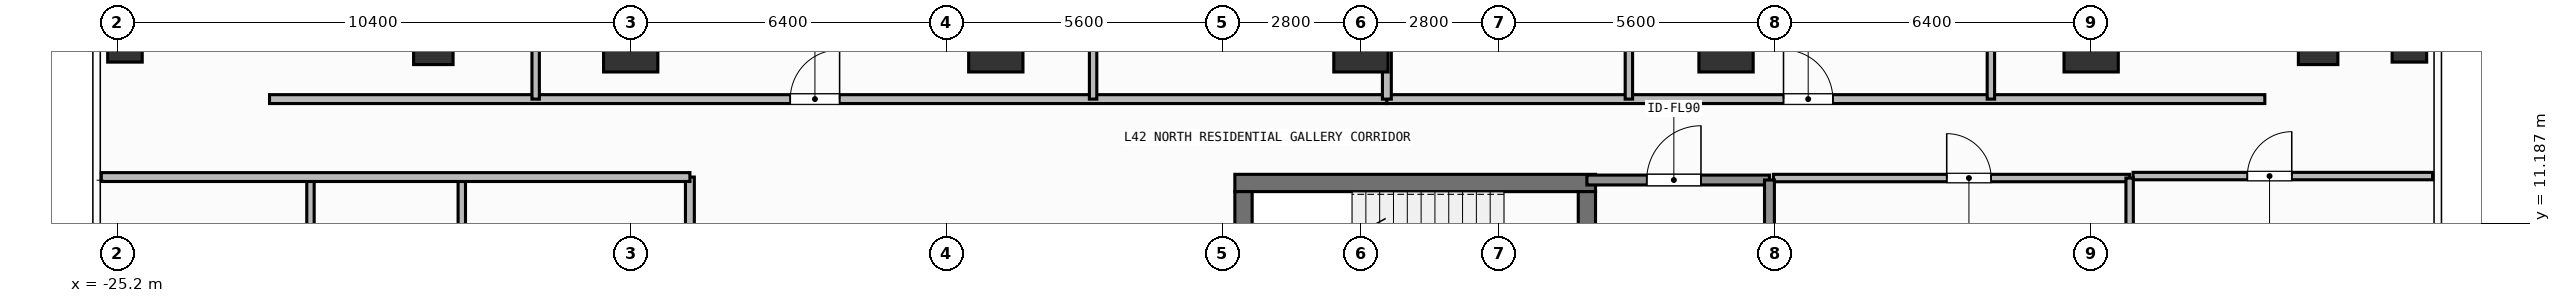
"""IFC4 building model, lengths in metres.
Left out: names, types, materials, properties, quantities, classifications, styles, units other than length and angle.
Written with IfcOpenShell. Run it as: python <this file> out.ifc"""

import sys

from ifc_helpers import new_model, si_unit, direction, frame, frame_2d, origin, origin_2d, place, context, subcontext, project, spatial, rectangle, hollow_rectangle, extrude, element, fill, save


model = new_model("IFC4")
c1 = context("Model", 3, precision=1e-05, world=origin(), true_north=direction((0.0, 1.0)))
c2 = subcontext(c1, "Body", "Model", "MODEL_VIEW")
j1 = project(units=[si_unit("LENGTHUNIT", "METRE"), si_unit("PLANEANGLEUNIT", "RADIAN")], contexts=[c1])
p1 = place(None, origin())
s1 = spatial("IfcSite", under=j1, at=p1, CompositionType="ELEMENT")
p2 = place(p1, origin())
s2 = spatial("IfcBuilding", under=s1, at=p2, CompositionType="ELEMENT")
p3 = place(p2, frame((0.0, 0.0, 171.9)))
s3 = spatial("IfcBuildingStorey", under=s2, at=p3, CompositionType="ELEMENT", Elevation=171.9)
p4 = place(p3, frame((-2.555, 12.0, 0.0), z_axis=(0.0, 0.0, 1.0), x_axis=(1.0, 0.0, 0.0)))
e1 = element("IfcWall", 1, at=p4, inside=s3, PredefinedType="SHEAR", context=c2, shape_type="SweptSolid", body=[
    extrude(rectangle(XDim=7.31, YDim=0.35, at=frame_2d((3.655, 0.0))), origin(), (0.0, 0.0, 1.0), 3.9),
])
p5 = place(p3, frame((-2.38, 8.9, 0.0), z_axis=(0.0, 0.0, 1.0), x_axis=(0.0, 1.0, 0.0)))
e2 = element("IfcWall", 2, at=p5, inside=s3, PredefinedType="SHEAR", context=c2, shape_type="SweptSolid", body=[
    extrude(rectangle(XDim=2.925, YDim=0.35, at=frame_2d((1.462, 0.0))), origin(), (0.0, 0.0, 1.0), 3.9),
])
p6 = place(p3, frame((4.58, 11.825, 0.0), z_axis=(0.0, 0.0, 1.0), x_axis=(0.0, -1.0, 0.0)))
e3 = element("IfcWall", 3, at=p6, inside=s3, PredefinedType="SHEAR", context=c2, shape_type="SweptSolid", body=[
    extrude(rectangle(XDim=2.925, YDim=0.35, at=frame_2d((1.462, 0.0))), origin(), (0.0, 0.0, 1.0), 3.9),
])
p7 = place(p6, frame((0.913, 0.0, 0.0)))
e4 = element("IfcOpeningElement", 4, at=p7, cuts=e3, PredefinedType="OPENING", context=c2, shape_type="SweptSolid", body=[
    extrude(rectangle(XDim=1.1, YDim=2.15, at=frame_2d((0.55, 1.075))), frame((0.0, 0.185, 0.0), z_axis=(0.0, -1.0, 0.0), x_axis=(1.0, 0.0, 0.0)), (0.0, 0.0, 1.0), 0.37),
])
for number, where, z_axis, x_axis in (
    (5, (-14.8, 14.8, 0.0), (0.0, 0.0, 1.0), (1.0, 0.0, 0.0)),
    (6, (-7.4, 14.8, 0.0), (0.0, 0.0, 1.0), (1.0, 0.0, 0.0)),
    (7, (0.0, 14.8, 0.0), (0.0, 0.0, 1.0), (1.0, 0.0, 0.0)),
    (8, (7.4, 14.8, 0.0), (0.0, 0.0, 1.0), (1.0, 0.0, 0.0)),
    (9, (14.8, 14.8, 0.0), (0.0, 0.0, 1.0), (1.0, 0.0, 0.0)),
):
    element("IfcColumn", number, at=place(p3, frame(where, z_axis=z_axis, x_axis=x_axis)), inside=s3, PredefinedType="COLUMN", context=c2, shape_type="SweptSolid", body=[
        extrude(rectangle(XDim=1.1, YDim=1.1, at=origin_2d()), origin(), (0.0, 0.0, 1.0), 3.9),
    ])
for number, where, z_axis, x_axis in (
    (10, (-18.8, 14.8, 0.0), (0.0, 0.0, 1.0), (1.0, 0.0, 0.0)),
    (11, (19.4, 14.8, 0.0), (0.0, 0.0, 1.0), (1.0, 0.0, 0.0)),
):
    element("IfcColumn", number, at=place(p3, frame(where, z_axis=z_axis, x_axis=x_axis)), inside=s3, PredefinedType="COLUMN", context=c2, shape_type="SweptSolid", body=[
        extrude(hollow_rectangle(XDim=0.8, YDim=0.8, WallThickness=0.036, at=origin_2d()), origin(), (0.0, 0.0, 1.0), 3.9),
    ])
for number, where, z_axis, x_axis in (
    (12, (-25.05, 14.8, 0.0), (0.0, 0.0, 1.0), (1.0, 0.0, 0.0)),
    (13, (21.25, 14.8, 0.0), (0.0, 0.0, 1.0), (1.0, 0.0, 0.0)),
):
    element("IfcColumn", number, at=place(p3, frame(where, z_axis=z_axis, x_axis=x_axis)), inside=s3, PredefinedType="COLUMN", context=c2, shape_type="SweptSolid", body=[
        extrude(hollow_rectangle(XDim=0.7, YDim=0.7, WallThickness=0.032, at=origin_2d()), origin(), (0.0, 0.0, 1.0), 3.9),
    ])
p8 = place(p3, frame((4.58, 12.06, 0.0), z_axis=(0.0, 0.0, 1.0), x_axis=(1.0, 0.0, 0.0)))
e14 = element("IfcWall", 14, at=p8, inside=s3, PredefinedType="SOLIDWALL", context=c2, shape_type="SweptSolid", body=[
    extrude(rectangle(XDim=3.7, YDim=0.2, at=frame_2d((1.85, 0.0))), origin(), (0.0, 0.0, 1.0), 3.68),
])
p9 = place(p8, frame((1.212, 0.0, 0.0)))
e15 = element("IfcOpeningElement", 15, at=p9, cuts=e14, PredefinedType="OPENING", context=c2, shape_type="SweptSolid", body=[
    extrude(rectangle(XDim=1.1, YDim=2.15, at=frame_2d((0.55, 1.075))), frame((0.0, 0.11, 0.0), z_axis=(0.0, -1.0, 0.0), x_axis=(1.0, 0.0, 0.0)), (0.0, 0.0, 1.0), 0.22),
])
p10 = place(p3, frame((8.36, 12.1, 0.0), z_axis=(0.0, 0.0, 1.0), x_axis=(1.0, 0.0, 0.0)))
e16 = element("IfcWall", 16, at=p10, inside=s3, PredefinedType="PARTITIONING", context=c2, shape_type="SweptSolid", body=[
    extrude(rectangle(XDim=7.22, YDim=0.15, at=frame_2d((3.61, 0.0))), origin(), (0.0, 0.0, 1.0), 3.68),
])
p11 = place(p10, frame((3.513, 0.0, 0.0)))
e17 = element("IfcOpeningElement", 17, at=p11, cuts=e16, PredefinedType="OPENING", context=c2, shape_type="SweptSolid", body=[
    extrude(rectangle(XDim=0.9, YDim=2.1, at=frame_2d((0.45, 1.05))), frame((0.0, 0.085, 0.0), z_axis=(0.0, -1.0, 0.0), x_axis=(1.0, 0.0, 0.0)), (0.0, 0.0, 1.0), 0.17),
])
p12 = place(p3, frame((-22.12, 13.7, 0.0), z_axis=(0.0, 0.0, 1.0), x_axis=(1.0, 0.0, 0.0)))
e18 = element("IfcWall", 18, at=p12, inside=s3, PredefinedType="PARTITIONING", context=c2, shape_type="SweptSolid", body=[
    extrude(rectangle(XDim=22.646, YDim=0.18, at=frame_2d((11.323, 0.0))), origin(), (0.0, 0.0, 1.0), 3.68),
])
p13 = place(p12, frame((10.554, 0.0, 0.0)))
e19 = element("IfcOpeningElement", 19, at=p13, cuts=e18, PredefinedType="OPENING", context=c2, shape_type="SweptSolid", body=[
    extrude(rectangle(XDim=1.0, YDim=2.2, at=frame_2d((0.5, 1.1))), frame((0.0, 0.1, 0.0), z_axis=(0.0, -1.0, 0.0), x_axis=(1.0, 0.0, 0.0)), (0.0, 0.0, 1.0), 0.2),
])
p14 = place(p3, frame((-16.726, 13.7, 0.0), z_axis=(0.0, 0.0, 1.0), x_axis=(0.0, 1.0, 0.0)))
e20 = element("IfcWall", 20, at=p14, inside=s3, PredefinedType="PARTITIONING", context=c2, shape_type="SweptSolid", body=[
    extrude(rectangle(XDim=5.934, YDim=0.15, at=frame_2d((2.967, 0.0))), origin(), (0.0, 0.0, 1.0), 3.68),
])
p15 = place(p14, frame((2.63, 0.0, 0.0)))
e21 = element("IfcOpeningElement", 21, at=p15, cuts=e20, PredefinedType="OPENING", context=c2, shape_type="SweptSolid", body=[
    extrude(rectangle(XDim=0.85, YDim=2.1, at=frame_2d((0.425, 1.05))), frame((0.0, 0.085, 0.0), z_axis=(0.0, -1.0, 0.0), x_axis=(1.0, 0.0, 0.0)), (0.0, 0.0, 1.0), 0.17),
])
p16 = place(p3, frame((-5.428, 13.7, 0.0), z_axis=(0.0, 0.0, 1.0), x_axis=(0.0, 1.0, 0.0)))
e22 = element("IfcWall", 22, at=p16, inside=s3, PredefinedType="PARTITIONING", context=c2, shape_type="SweptSolid", body=[
    extrude(rectangle(XDim=4.154, YDim=0.15, at=frame_2d((2.077, 0.0))), origin(), (0.0, 0.0, 1.0), 3.68),
])
p17 = place(p16, frame((1.74, 0.0, 0.0)))
e23 = element("IfcOpeningElement", 23, at=p17, cuts=e22, PredefinedType="OPENING", context=c2, shape_type="SweptSolid", body=[
    extrude(rectangle(XDim=0.85, YDim=2.1, at=frame_2d((0.425, 1.05))), frame((0.0, 0.085, 0.0), z_axis=(0.0, -1.0, 0.0), x_axis=(1.0, 0.0, 0.0)), (0.0, 0.0, 1.0), 0.17),
])
p18 = place(p3, frame((0.526, 13.7, 0.0), z_axis=(0.0, 0.0, 1.0), x_axis=(1.0, 0.0, 0.0)))
e24 = element("IfcWall", 24, at=p18, inside=s3, PredefinedType="PARTITIONING", context=c2, shape_type="SweptSolid", body=[
    extrude(rectangle(XDim=17.794, YDim=0.18, at=frame_2d((8.897, 0.0))), origin(), (0.0, 0.0, 1.0), 3.68),
])
p19 = place(p18, frame((8.039, 0.0, 0.0)))
e25 = element("IfcOpeningElement", 25, at=p19, cuts=e24, PredefinedType="OPENING", context=c2, shape_type="SweptSolid", body=[
    extrude(rectangle(XDim=1.0, YDim=2.2, at=frame_2d((0.5, 1.1))), frame((0.0, 0.1, 0.0), z_axis=(0.0, -1.0, 0.0), x_axis=(1.0, 0.0, 0.0)), (0.0, 0.0, 1.0), 0.2),
])
p20 = place(p3, frame((5.431, 13.7, 0.0), z_axis=(0.0, 0.0, 1.0), x_axis=(0.0, 1.0, 0.0)))
e26 = element("IfcWall", 26, at=p20, inside=s3, PredefinedType="PARTITIONING", context=c2, shape_type="SweptSolid", body=[
    extrude(rectangle(XDim=5.69, YDim=0.15, at=frame_2d((2.845, 0.0))), origin(), (0.0, 0.0, 1.0), 3.68),
])
p21 = place(p20, frame((2.42, 0.0, 0.0)))
e27 = element("IfcOpeningElement", 27, at=p21, cuts=e26, PredefinedType="OPENING", context=c2, shape_type="SweptSolid", body=[
    extrude(rectangle(XDim=0.85, YDim=2.1, at=frame_2d((0.425, 1.05))), frame((0.0, 0.085, 0.0), z_axis=(0.0, -1.0, 0.0), x_axis=(1.0, 0.0, 0.0)), (0.0, 0.0, 1.0), 0.17),
])
p22 = place(p3, frame((12.768, 13.7, 0.0), z_axis=(0.0, 0.0, 1.0), x_axis=(0.0, 1.0, 0.0)))
e28 = element("IfcWall", 28, at=p22, inside=s3, PredefinedType="PARTITIONING", context=c2, shape_type="SweptSolid", body=[
    extrude(rectangle(XDim=3.983, YDim=0.15, at=frame_2d((1.992, 0.0))), origin(), (0.0, 0.0, 1.0), 3.68),
])
p23 = place(p22, frame((1.566, 0.0, 0.0)))
e29 = element("IfcOpeningElement", 29, at=p23, cuts=e28, PredefinedType="OPENING", context=c2, shape_type="SweptSolid", body=[
    extrude(rectangle(XDim=0.85, YDim=2.1, at=frame_2d((0.425, 1.05))), frame((0.0, 0.085, 0.0), z_axis=(0.0, -1.0, 0.0), x_axis=(1.0, 0.0, 0.0)), (0.0, 0.0, 1.0), 0.17),
])
p24 = place(p3, frame((-13.6, -12.12, 0.0), z_axis=(0.0, 0.0, 1.0), x_axis=(0.0, 1.0, 0.0)))
e30 = element("IfcWall", 30, at=p24, inside=s3, PredefinedType="PARTITIONING", context=c2, shape_type="SweptSolid", body=[
    extrude(rectangle(XDim=24.24, YDim=0.18, at=frame_2d((12.12, 0.0))), origin(), (0.0, 0.0, 1.0), 3.68),
])
p25 = place(p24, frame((11.62, 0.0, 0.0)))
e31 = element("IfcOpeningElement", 31, at=p25, cuts=e30, PredefinedType="OPENING", context=c2, shape_type="SweptSolid", body=[
    extrude(rectangle(XDim=1.0, YDim=2.2, at=frame_2d((0.5, 1.1))), frame((0.0, 0.1, 0.0), z_axis=(0.0, -1.0, 0.0), x_axis=(1.0, 0.0, 0.0)), (0.0, 0.0, 1.0), 0.2),
])
p26 = place(p3, frame((15.65, 12.14, 0.0), z_axis=(0.0, 0.0, 1.0), x_axis=(1.0, 0.0, 0.0)))
e32 = element("IfcWall", 32, at=p26, inside=s3, PredefinedType="PARTITIONING", context=c2, shape_type="SweptSolid", body=[
    extrude(rectangle(XDim=6.07, YDim=0.15, at=frame_2d((3.035, 0.0))), origin(), (0.0, 0.0, 1.0), 3.68),
])
p27 = place(p26, frame((2.316, 0.0, 0.0)))
e33 = element("IfcOpeningElement", 33, at=p27, cuts=e32, PredefinedType="OPENING", context=c2, shape_type="SweptSolid", body=[
    extrude(rectangle(XDim=0.9, YDim=2.1, at=frame_2d((0.45, 1.05))), frame((0.0, 0.085, 0.0), z_axis=(0.0, -1.0, 0.0), x_axis=(1.0, 0.0, 0.0)), (0.0, 0.0, 1.0), 0.17),
])
p28 = place(p3, frame((8.28, 8.8, 0.0), z_axis=(0.0, 0.0, 1.0), x_axis=(0.0, 1.0, 0.0)))
e34 = element("IfcWall", 34, at=p28, inside=s3, PredefinedType="SOLIDWALL", context=c2, shape_type="SweptSolid", body=[
    extrude(rectangle(XDim=3.26, YDim=0.2, at=frame_2d((1.63, 0.0))), origin(), (0.0, 0.0, 1.0), 3.68),
])
p29 = place(p3, frame((15.58, 5.85, 0.0), z_axis=(0.0, 0.0, 1.0), x_axis=(0.0, 1.0, 0.0)))
e35 = element("IfcWall", 35, at=p29, inside=s3, PredefinedType="PARTITIONING", context=c2, shape_type="SweptSolid", body=[
    extrude(rectangle(XDim=6.25, YDim=0.15, at=frame_2d((3.125, 0.0))), origin(), (0.0, 0.0, 1.0), 3.68),
])
p30 = place(p3, frame((0.526, 13.7, 0.0), z_axis=(0.0, 0.0, 1.0), x_axis=(0.0, 1.0, 0.0)))
e36 = element("IfcWall", 36, at=p30, inside=s3, PredefinedType="PARTITIONING", context=c2, shape_type="SweptSolid", body=[
    extrude(rectangle(XDim=9.93, YDim=0.18, at=frame_2d((4.965, 0.0))), origin(), (0.0, 0.0, 1.0), 3.68),
])
for number, where, z_axis, x_axis in (
    (37, (-18.223, 5.436, 0.0), (0.0, 0.0, 1.0), (0.0, 1.0, 0.0)),
    (38, (-21.29, 5.436, 0.0), (0.0, 0.0, 1.0), (0.0, 1.0, 0.0)),
):
    element("IfcWall", number, at=place(p3, frame(where, z_axis=z_axis, x_axis=x_axis)), inside=s3, PredefinedType="PARTITIONING", context=c2, shape_type="SweptSolid", body=[
        extrude(rectangle(XDim=6.684, YDim=0.15, at=frame_2d((3.342, 0.0))), origin(), (0.0, 0.0, 1.0), 3.68),
    ])
p31 = place(p3, frame((-25.53, 12.12, 0.0), z_axis=(0.0, 0.0, 1.0), x_axis=(1.0, 0.0, 0.0)))
e39 = element("IfcWall", 39, at=p31, inside=s3, PredefinedType="PARTITIONING", context=c2, shape_type="SweptSolid", body=[
    extrude(rectangle(XDim=11.93, YDim=0.18, at=frame_2d((5.965, 0.0))), origin(), (0.0, 0.0, 1.0), 3.68),
])
p32 = place(p9, origin())
e40 = element("IfcDoor", 40, at=p32, inside=s3, OperationType="SINGLE_SWING_RIGHT", PredefinedType="DOOR", context=c2, shape_type="SweptSolid", body=[
    extrude(rectangle(XDim=1.1, YDim=2.15, at=frame_2d((0.55, 1.075))), frame((0.0, 0.025, 0.0), z_axis=(0.0, -1.0, 0.0), x_axis=(1.0, 0.0, 0.0)), (0.0, 0.0, 1.0), 0.05),
])
fill(e15, e40)
p33 = place(p11, origin())
e41 = element("IfcDoor", 41, at=p33, inside=s3, OperationType="SINGLE_SWING_LEFT", PredefinedType="DOOR", context=c2, shape_type="SweptSolid", body=[
    extrude(rectangle(XDim=0.9, YDim=2.1, at=frame_2d((0.45, 1.05))), frame((0.0, 0.025, 0.0), z_axis=(0.0, -1.0, 0.0), x_axis=(1.0, 0.0, 0.0)), (0.0, 0.0, 1.0), 0.05),
])
fill(e17, e41)
p34 = place(p13, origin())
e42 = element("IfcDoor", 42, at=p34, inside=s3, OperationType="SINGLE_SWING_RIGHT", PredefinedType="DOOR", context=c2, shape_type="SweptSolid", body=[
    extrude(rectangle(XDim=1.0, YDim=2.2, at=frame_2d((0.5, 1.1))), frame((0.0, 0.025, 0.0), z_axis=(0.0, -1.0, 0.0), x_axis=(1.0, 0.0, 0.0)), (0.0, 0.0, 1.0), 0.05),
])
fill(e19, e42)
p35 = place(p19, origin())
e43 = element("IfcDoor", 43, at=p35, inside=s3, OperationType="SINGLE_SWING_LEFT", PredefinedType="DOOR", context=c2, shape_type="SweptSolid", body=[
    extrude(rectangle(XDim=1.0, YDim=2.2, at=frame_2d((0.5, 1.1))), frame((0.0, 0.025, 0.0), z_axis=(0.0, -1.0, 0.0), x_axis=(1.0, 0.0, 0.0)), (0.0, 0.0, 1.0), 0.05),
])
fill(e25, e43)
p36 = place(p27, origin())
e44 = element("IfcDoor", 44, at=p36, inside=s3, OperationType="SINGLE_SWING_RIGHT", PredefinedType="DOOR", context=c2, shape_type="SweptSolid", body=[
    extrude(rectangle(XDim=0.9, YDim=2.1, at=frame_2d((0.45, 1.05))), frame((0.0, 0.025, 0.0), z_axis=(0.0, -1.0, 0.0), x_axis=(1.0, 0.0, 0.0)), (0.0, 0.0, 1.0), 0.05),
])
fill(e33, e44)
save(model, sys.argv[1])
